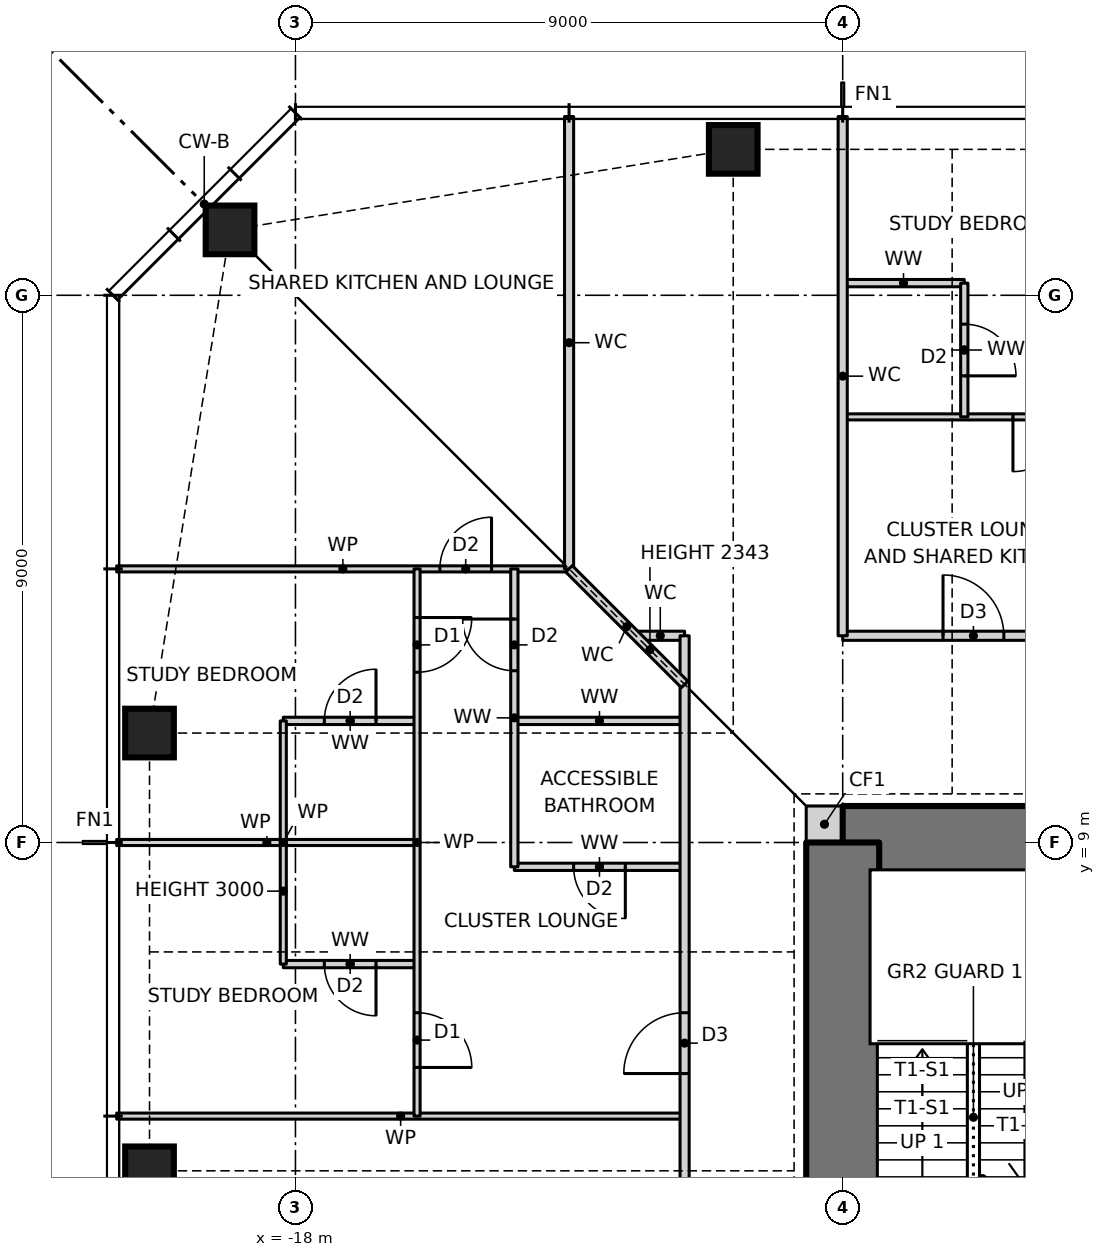
"""IFC4 building model, lengths in metres.
Left out: names, types, materials, properties, quantities, classifications, styles, units other than length and angle.
Written with IfcOpenShell. Run it as: python <this file> out.ifc"""

import sys

from ifc_helpers import new_model, si_unit, direction, frame, frame_2d, origin, origin_2d, place, context, subcontext, project, spatial, rectangle, hollow_rectangle, extrude, element, fill, save


model = new_model("IFC4")
c1 = context("Model", 3, precision=1e-05, world=origin(), true_north=direction((0.0, 1.0)))
c2 = subcontext(c1, "Body", "Model", "MODEL_VIEW")
j1 = project(units=[si_unit("LENGTHUNIT", "METRE"), si_unit("PLANEANGLEUNIT", "RADIAN")], contexts=[c1])
p1 = place(None, origin())
s1 = spatial("IfcSite", under=j1, at=p1, CompositionType="ELEMENT")
p2 = place(p1, origin())
s2 = spatial("IfcBuilding", under=s1, at=p2, CompositionType="ELEMENT")
p3 = place(p2, frame((0.0, 0.0, 119.0)))
s3 = spatial("IfcBuildingStorey", under=s2, at=p3, CompositionType="ELEMENT", Elevation=119.0)
for number, where, z_axis, x_axis in (
    (1, (-10.8, 20.4, 0.0), (0.0, 0.0, 1.0), (1.0, 0.0, 0.0)),
    (2, (-19.076, 19.076, 0.0), (0.0, 0.0, 1.0), (1.0, 0.0, 0.0)),
    (3, (-20.4, 10.8, 0.0), (0.0, 0.0, 1.0), (1.0, 0.0, 0.0)),
    (4, (-20.4, 3.6, 0.0), (0.0, 0.0, 1.0), (1.0, 0.0, 0.0)),
):
    element("IfcColumn", number, at=place(p3, frame(where, z_axis=z_axis, x_axis=x_axis)), inside=s3, PredefinedType="COLUMN", context=c2, shape_type="SweptSolid", body=[
        extrude(hollow_rectangle(XDim=0.8, YDim=0.8, WallThickness=0.07, at=origin_2d()), origin(), (0.0, 0.0, 1.0), 3.5),
    ])
p4 = place(p3, frame((-9.6, 9.3, 0.0), z_axis=(0.0, 0.0, 1.0), x_axis=(1.0, 0.0, 0.0)))
e5 = element("IfcWall", 5, at=p4, inside=s3, PredefinedType="SOLIDWALL", context=c2, shape_type="SweptSolid", body=[
    extrude(rectangle(XDim=0.6, YDim=0.6, at=frame_2d((0.3, 0.0))), origin(), (0.0, 0.0, 1.0), 3.5),
])
p5 = place(p3, frame((9.0, 9.0, 0.0), z_axis=(0.0, 0.0, 1.0), x_axis=(-1.0, 0.0, 0.0)))
e6 = element("IfcWall", 6, at=p5, inside=s3, PredefinedType="SHEAR", context=c2, shape_type="SweptSolid", body=[
    extrude(rectangle(XDim=18.0, YDim=1.2, at=frame_2d((9.0, 0.0))), origin(), (0.0, 0.0, 1.0), 3.5),
])
p6 = place(p5, frame((11.125, 0.0, 0.0)))
e7 = element("IfcOpeningElement", 7, at=p6, cuts=e6, PredefinedType="OPENING", context=c2, shape_type="SweptSolid", body=[
    extrude(rectangle(XDim=0.9, YDim=2.1, at=frame_2d((0.45, 1.05))), frame((0.0, 0.61, 0.0), z_axis=(0.0, -1.0, 0.0), x_axis=(1.0, 0.0, 0.0)), (0.0, 0.0, 1.0), 1.22),
])
p7 = place(p5, frame((4.275, 0.0, 0.0)))
e8 = element("IfcOpeningElement", 8, at=p7, cuts=e6, PredefinedType="OPENING", context=c2, shape_type="SweptSolid", body=[
    extrude(rectangle(XDim=0.9, YDim=2.1, at=frame_2d((0.45, 1.05))), frame((0.0, 0.61, 0.0), z_axis=(0.0, -1.0, 0.0), x_axis=(1.0, 0.0, 0.0)), (0.0, 0.0, 1.0), 1.22),
])
p8 = place(p3, frame((-9.0, 9.0, 0.0), z_axis=(0.0, 0.0, 1.0), x_axis=(0.0, -1.0, 0.0)))
e9 = element("IfcWall", 9, at=p8, inside=s3, PredefinedType="SHEAR", context=c2, shape_type="SweptSolid", body=[
    extrude(rectangle(XDim=18.0, YDim=1.2, at=frame_2d((9.0, 0.0))), origin(), (0.0, 0.0, 1.0), 3.5),
])
p9 = place(p8, frame((8.5, 0.0, 0.0)))
e10 = element("IfcOpeningElement", 10, at=p9, cuts=e9, PredefinedType="OPENING", context=c2, shape_type="SweptSolid", body=[
    extrude(rectangle(XDim=1.0, YDim=2.1, at=frame_2d((0.5, 1.05))), frame((0.0, 0.61, 0.0), z_axis=(0.0, -1.0, 0.0), x_axis=(1.0, 0.0, 0.0)), (0.0, 0.0, 1.0), 1.22),
])
p10 = place(p3, frame((-20.94, 4.5, 0.0), z_axis=(0.0, 0.0, 1.0), x_axis=(1.0, 0.0, 0.0)))
e11 = element("IfcWall", 11, at=p10, inside=s3, PredefinedType="PARTITIONING", context=c2, shape_type="SweptSolid", body=[
    extrude(rectangle(XDim=9.34, YDim=0.1, at=frame_2d((4.67, 0.0))), origin(), (0.0, 0.0, 1.0), 3.27),
])
p11 = place(p3, frame((-18.2, 7.0, 0.0), z_axis=(0.0, 0.0, 1.0), x_axis=(1.0, 0.0, 0.0)))
e12 = element("IfcWall", 12, at=p11, inside=s3, PredefinedType="PARTITIONING", context=c2, shape_type="SweptSolid", body=[
    extrude(rectangle(XDim=2.2, YDim=0.12, at=frame_2d((1.1, 0.0))), origin(), (0.0, 0.0, 1.0), 3.27),
])
p12 = place(p11, frame((0.675, 0.0, 0.0)))
e13 = element("IfcOpeningElement", 13, at=p12, cuts=e12, PredefinedType="OPENING", context=c2, shape_type="SweptSolid", body=[
    extrude(rectangle(XDim=0.85, YDim=2.1, at=frame_2d((0.425, 1.05))), frame((0.0, 0.07, 0.0), z_axis=(0.0, -1.0, 0.0), x_axis=(1.0, 0.0, 0.0)), (0.0, 0.0, 1.0), 0.14),
])
p13 = place(p3, frame((-14.4, 8.6, 0.0), z_axis=(0.0, 0.0, 1.0), x_axis=(1.0, 0.0, 0.0)))
e14 = element("IfcWall", 14, at=p13, inside=s3, PredefinedType="PARTITIONING", context=c2, shape_type="SweptSolid", body=[
    extrude(rectangle(XDim=2.8, YDim=0.12, at=frame_2d((1.4, 0.0))), origin(), (0.0, 0.0, 1.0), 3.27),
])
p14 = place(p13, frame((0.975, 0.0, 0.0)))
e15 = element("IfcOpeningElement", 15, at=p14, cuts=e14, PredefinedType="OPENING", context=c2, shape_type="SweptSolid", body=[
    extrude(rectangle(XDim=0.85, YDim=2.1, at=frame_2d((0.425, 1.05))), frame((0.0, 0.07, 0.0), z_axis=(0.0, -1.0, 0.0), x_axis=(1.0, 0.0, 0.0)), (0.0, 0.0, 1.0), 0.14),
])
p15 = place(p3, frame((-20.94, 9.0, 0.0), z_axis=(0.0, 0.0, 1.0), x_axis=(1.0, 0.0, 0.0)))
e16 = element("IfcWall", 16, at=p15, inside=s3, PredefinedType="PARTITIONING", context=c2, shape_type="SweptSolid", body=[
    extrude(rectangle(XDim=4.94, YDim=0.1, at=frame_2d((2.47, 0.0))), origin(), (0.0, 0.0, 1.0), 3.27),
])
p16 = place(p3, frame((-18.2, 11.0, 0.0), z_axis=(0.0, 0.0, 1.0), x_axis=(1.0, 0.0, 0.0)))
e17 = element("IfcWall", 17, at=p16, inside=s3, PredefinedType="PARTITIONING", context=c2, shape_type="SweptSolid", body=[
    extrude(rectangle(XDim=2.2, YDim=0.12, at=frame_2d((1.1, 0.0))), origin(), (0.0, 0.0, 1.0), 3.27),
])
p17 = place(p16, frame((0.675, 0.0, 0.0)))
e18 = element("IfcOpeningElement", 18, at=p17, cuts=e17, PredefinedType="OPENING", context=c2, shape_type="SweptSolid", body=[
    extrude(rectangle(XDim=0.85, YDim=2.1, at=frame_2d((0.425, 1.05))), frame((0.0, 0.07, 0.0), z_axis=(0.0, -1.0, 0.0), x_axis=(1.0, 0.0, 0.0)), (0.0, 0.0, 1.0), 0.14),
])
p18 = place(p3, frame((-14.4, 11.0, 0.0), z_axis=(0.0, 0.0, 1.0), x_axis=(1.0, 0.0, 0.0)))
e19 = element("IfcWall", 19, at=p18, inside=s3, PredefinedType="PARTITIONING", context=c2, shape_type="SweptSolid", body=[
    extrude(rectangle(XDim=2.8, YDim=0.12, at=frame_2d((1.4, 0.0))), origin(), (0.0, 0.0, 1.0), 3.27),
])
p19 = place(p3, frame((-12.4, 12.4, 0.0), z_axis=(0.0, 0.0, 1.0), x_axis=(1.0, 0.0, 0.0)))
e20 = element("IfcWall", 20, at=p19, inside=s3, PredefinedType="PARTITIONING", context=c2, shape_type="SweptSolid", body=[
    extrude(rectangle(XDim=0.8, YDim=0.15, at=frame_2d((0.4, 0.0))), origin(), (0.0, 0.0, 1.0), 3.27),
])
p20 = place(p3, frame((-9.0, 12.4, 0.0), z_axis=(0.0, 0.0, 1.0), x_axis=(1.0, 0.0, 0.0)))
e21 = element("IfcWall", 21, at=p20, inside=s3, PredefinedType="PARTITIONING", context=c2, shape_type="SweptSolid", body=[
    extrude(rectangle(XDim=21.4, YDim=0.15, at=frame_2d((10.7, 0.0))), origin(), (0.0, 0.0, 1.0), 3.27),
])
p21 = place(p20, frame((17.05, 0.0, 0.0)))
e22 = element("IfcOpeningElement", 22, at=p21, cuts=e21, PredefinedType="OPENING", context=c2, shape_type="SweptSolid", body=[
    extrude(rectangle(XDim=1.0, YDim=2.1, at=frame_2d((0.5, 1.05))), frame((0.0, 0.085, 0.0), z_axis=(0.0, -1.0, 0.0), x_axis=(1.0, 0.0, 0.0)), (0.0, 0.0, 1.0), 0.17),
])
p22 = place(p20, frame((1.65, 0.0, 0.0)))
e23 = element("IfcOpeningElement", 23, at=p22, cuts=e21, PredefinedType="OPENING", context=c2, shape_type="SweptSolid", body=[
    extrude(rectangle(XDim=1.0, YDim=2.1, at=frame_2d((0.5, 1.05))), frame((0.0, 0.085, 0.0), z_axis=(0.0, -1.0, 0.0), x_axis=(1.0, 0.0, 0.0)), (0.0, 0.0, 1.0), 0.17),
])
p23 = place(p3, frame((-20.94, 13.5, 0.0), z_axis=(0.0, 0.0, 1.0), x_axis=(1.0, 0.0, 0.0)))
e24 = element("IfcWall", 24, at=p23, inside=s3, PredefinedType="PARTITIONING", context=c2, shape_type="SweptSolid", body=[
    extrude(rectangle(XDim=7.44, YDim=0.1, at=frame_2d((3.72, 0.0))), origin(), (0.0, 0.0, 1.0), 3.27),
])
p24 = place(p23, frame((5.315, 0.0, 0.0)))
e25 = element("IfcOpeningElement", 25, at=p24, cuts=e24, PredefinedType="OPENING", context=c2, shape_type="SweptSolid", body=[
    extrude(rectangle(XDim=0.85, YDim=2.1, at=frame_2d((0.425, 1.05))), frame((0.0, 0.06, 0.0), z_axis=(0.0, -1.0, 0.0), x_axis=(1.0, 0.0, 0.0)), (0.0, 0.0, 1.0), 0.12),
])
p25 = place(p3, frame((-9.0, 16.0, 0.0), z_axis=(0.0, 0.0, 1.0), x_axis=(1.0, 0.0, 0.0)))
e26 = element("IfcWall", 26, at=p25, inside=s3, PredefinedType="PARTITIONING", context=c2, shape_type="SweptSolid", body=[
    extrude(rectangle(XDim=22.5, YDim=0.1, at=frame_2d((11.25, 0.0))), origin(), (0.0, 0.0, 1.0), 3.27),
])
p26 = place(p25, frame((20.8, 0.0, 0.0)))
e27 = element("IfcOpeningElement", 27, at=p26, cuts=e26, PredefinedType="OPENING", context=c2, shape_type="SweptSolid", body=[
    extrude(rectangle(XDim=0.9, YDim=2.1, at=frame_2d((0.45, 1.05))), frame((0.0, 0.06, 0.0), z_axis=(0.0, -1.0, 0.0), x_axis=(1.0, 0.0, 0.0)), (0.0, 0.0, 1.0), 0.12),
])
p27 = place(p25, frame((14.3, 0.0, 0.0)))
e28 = element("IfcOpeningElement", 28, at=p27, cuts=e26, PredefinedType="OPENING", context=c2, shape_type="SweptSolid", body=[
    extrude(rectangle(XDim=0.9, YDim=2.1, at=frame_2d((0.45, 1.05))), frame((0.0, 0.06, 0.0), z_axis=(0.0, -1.0, 0.0), x_axis=(1.0, 0.0, 0.0)), (0.0, 0.0, 1.0), 0.12),
])
p28 = place(p25, frame((11.8, 0.0, 0.0)))
e29 = element("IfcOpeningElement", 29, at=p28, cuts=e26, PredefinedType="OPENING", context=c2, shape_type="SweptSolid", body=[
    extrude(rectangle(XDim=0.9, YDim=2.1, at=frame_2d((0.45, 1.05))), frame((0.0, 0.06, 0.0), z_axis=(0.0, -1.0, 0.0), x_axis=(1.0, 0.0, 0.0)), (0.0, 0.0, 1.0), 0.12),
])
p29 = place(p25, frame((5.3, 0.0, 0.0)))
e30 = element("IfcOpeningElement", 30, at=p29, cuts=e26, PredefinedType="OPENING", context=c2, shape_type="SweptSolid", body=[
    extrude(rectangle(XDim=0.9, YDim=2.1, at=frame_2d((0.45, 1.05))), frame((0.0, 0.06, 0.0), z_axis=(0.0, -1.0, 0.0), x_axis=(1.0, 0.0, 0.0)), (0.0, 0.0, 1.0), 0.12),
])
p30 = place(p25, frame((2.8, 0.0, 0.0)))
e31 = element("IfcOpeningElement", 31, at=p30, cuts=e26, PredefinedType="OPENING", context=c2, shape_type="SweptSolid", body=[
    extrude(rectangle(XDim=0.9, YDim=2.1, at=frame_2d((0.45, 1.05))), frame((0.0, 0.06, 0.0), z_axis=(0.0, -1.0, 0.0), x_axis=(1.0, 0.0, 0.0)), (0.0, 0.0, 1.0), 0.12),
])
p31 = place(p3, frame((-9.0, 18.2, 0.0), z_axis=(0.0, 0.0, 1.0), x_axis=(1.0, 0.0, 0.0)))
e32 = element("IfcWall", 32, at=p31, inside=s3, PredefinedType="PARTITIONING", context=c2, shape_type="SweptSolid", body=[
    extrude(rectangle(XDim=2.0, YDim=0.12, at=frame_2d((1.0, 0.0))), origin(), (0.0, 0.0, 1.0), 3.27),
])
p32 = place(p3, frame((-7.0, 16.0, 0.0), z_axis=(0.0, 0.0, 1.0), x_axis=(0.0, 1.0, 0.0)))
e33 = element("IfcWall", 33, at=p32, inside=s3, PredefinedType="PARTITIONING", context=c2, shape_type="SweptSolid", body=[
    extrude(rectangle(XDim=2.2, YDim=0.12, at=frame_2d((1.1, 0.0))), origin(), (0.0, 0.0, 1.0), 3.27),
])
p33 = place(p32, frame((0.675, 0.0, 0.0)))
e34 = element("IfcOpeningElement", 34, at=p33, cuts=e33, PredefinedType="OPENING", context=c2, shape_type="SweptSolid", body=[
    extrude(rectangle(XDim=0.85, YDim=2.1, at=frame_2d((0.425, 1.05))), frame((0.0, 0.07, 0.0), z_axis=(0.0, -1.0, 0.0), x_axis=(1.0, 0.0, 0.0)), (0.0, 0.0, 1.0), 0.14),
])
p34 = place(p3, frame((-9.0, 12.4, 0.0), z_axis=(0.0, 0.0, 1.0), x_axis=(0.0, 1.0, 0.0)))
e35 = element("IfcWall", 35, at=p34, inside=s3, PredefinedType="PARTITIONING", context=c2, shape_type="SweptSolid", body=[
    extrude(rectangle(XDim=8.54, YDim=0.15, at=frame_2d((4.27, 0.0))), origin(), (0.0, 0.0, 1.0), 3.27),
])
p35 = place(p3, frame((-11.6, -9.0, 0.0), z_axis=(0.0, 0.0, 1.0), x_axis=(0.0, 1.0, 0.0)))
e36 = element("IfcWall", 36, at=p35, inside=s3, PredefinedType="PARTITIONING", context=c2, shape_type="SweptSolid", body=[
    extrude(rectangle(XDim=21.4, YDim=0.15, at=frame_2d((10.7, 0.0))), origin(), (0.0, 0.0, 1.0), 3.27),
])
p36 = place(p35, frame((14.2, 0.0, 0.0)))
e37 = element("IfcOpeningElement", 37, at=p36, cuts=e36, PredefinedType="OPENING", context=c2, shape_type="SweptSolid", body=[
    extrude(rectangle(XDim=1.0, YDim=2.1, at=frame_2d((0.5, 1.05))), frame((0.0, 0.085, 0.0), z_axis=(0.0, -1.0, 0.0), x_axis=(1.0, 0.0, 0.0)), (0.0, 0.0, 1.0), 0.17),
])
p37 = place(p35, frame((5.85, 0.0, 0.0)))
e38 = element("IfcOpeningElement", 38, at=p37, cuts=e36, PredefinedType="OPENING", context=c2, shape_type="SweptSolid", body=[
    extrude(rectangle(XDim=1.8, YDim=2.1, at=frame_2d((0.9, 1.05))), frame((0.0, 0.085, 0.0), z_axis=(0.0, -1.0, 0.0), x_axis=(1.0, 0.0, 0.0)), (0.0, 0.0, 1.0), 0.17),
])
p38 = place(p3, frame((-13.5, 13.5, 0.0), z_axis=(0.0, 0.0, 1.0), x_axis=(0.0, 1.0, 0.0)))
e39 = element("IfcWall", 39, at=p38, inside=s3, PredefinedType="PARTITIONING", context=c2, shape_type="SweptSolid", body=[
    extrude(rectangle(XDim=7.44, YDim=0.15, at=frame_2d((3.72, 0.0))), origin(), (0.0, 0.0, 1.0), 3.27),
])
p39 = place(p3, frame((-14.4, 8.6, 0.0), z_axis=(0.0, 0.0, 1.0), x_axis=(0.0, 1.0, 0.0)))
e40 = element("IfcWall", 40, at=p39, inside=s3, PredefinedType="PARTITIONING", context=c2, shape_type="SweptSolid", body=[
    extrude(rectangle(XDim=4.9, YDim=0.12, at=frame_2d((2.45, 0.0))), origin(), (0.0, 0.0, 1.0), 3.27),
])
p40 = place(p39, frame((3.225, 0.0, 0.0)))
e41 = element("IfcOpeningElement", 41, at=p40, cuts=e40, PredefinedType="OPENING", context=c2, shape_type="SweptSolid", body=[
    extrude(rectangle(XDim=0.85, YDim=2.1, at=frame_2d((0.425, 1.05))), frame((0.0, 0.07, 0.0), z_axis=(0.0, -1.0, 0.0), x_axis=(1.0, 0.0, 0.0)), (0.0, 0.0, 1.0), 0.14),
])
p41 = place(p3, frame((-16.0, 4.5, 0.0), z_axis=(0.0, 0.0, 1.0), x_axis=(0.0, 1.0, 0.0)))
e42 = element("IfcWall", 42, at=p41, inside=s3, PredefinedType="PARTITIONING", context=c2, shape_type="SweptSolid", body=[
    extrude(rectangle(XDim=9.0, YDim=0.1, at=frame_2d((4.5, 0.0))), origin(), (0.0, 0.0, 1.0), 3.27),
])
p42 = place(p41, frame((7.3, 0.0, 0.0)))
e43 = element("IfcOpeningElement", 43, at=p42, cuts=e42, PredefinedType="OPENING", context=c2, shape_type="SweptSolid", body=[
    extrude(rectangle(XDim=0.9, YDim=2.1, at=frame_2d((0.45, 1.05))), frame((0.0, 0.06, 0.0), z_axis=(0.0, -1.0, 0.0), x_axis=(1.0, 0.0, 0.0)), (0.0, 0.0, 1.0), 0.12),
])
p43 = place(p41, frame((0.8, 0.0, 0.0)))
e44 = element("IfcOpeningElement", 44, at=p43, cuts=e42, PredefinedType="OPENING", context=c2, shape_type="SweptSolid", body=[
    extrude(rectangle(XDim=0.9, YDim=2.1, at=frame_2d((0.45, 1.05))), frame((0.0, 0.06, 0.0), z_axis=(0.0, -1.0, 0.0), x_axis=(1.0, 0.0, 0.0)), (0.0, 0.0, 1.0), 0.12),
])
p44 = place(p3, frame((-18.2, 7.0, 0.0), z_axis=(0.0, 0.0, 1.0), x_axis=(0.0, 1.0, 0.0)))
e45 = element("IfcWall", 45, at=p44, inside=s3, PredefinedType="PARTITIONING", context=c2, shape_type="SweptSolid", body=[
    extrude(rectangle(XDim=4.0, YDim=0.1, at=frame_2d((2.0, 0.0))), origin(), (0.0, 0.0, 1.0), 3.0),
])
p45 = place(p3, frame((-11.6, 11.6, 0.0), z_axis=(0.0, 0.0, 1.0), x_axis=(-0.707106781187, 0.707106781187, 0.0)))
e46 = element("IfcWall", 46, at=p45, inside=s3, PredefinedType="PARTITIONING", context=c2, shape_type="SweptSolid", body=[
    extrude(rectangle(XDim=2.687, YDim=0.15, at=frame_2d((1.343, 0.0))), origin(), (0.0, 0.0, 1.0), 2.343),
])
p46 = place(p33, frame((0.85, 0.0, 0.0), z_axis=(0.0, 0.0, 1.0), x_axis=(-1.0, 0.0, 0.0)))
e47 = element("IfcDoor", 47, at=p46, inside=s3, OperationType="SINGLE_SWING_RIGHT", PredefinedType="DOOR", context=c2, shape_type="SweptSolid", body=[
    extrude(rectangle(XDim=0.85, YDim=2.1, at=frame_2d((0.425, 1.05))), frame((0.0, 0.025, 0.0), z_axis=(0.0, -1.0, 0.0), x_axis=(1.0, 0.0, 0.0)), (0.0, 0.0, 1.0), 0.05),
])
fill(e34, e47)
p47 = place(p30, frame((0.9, 0.0, 0.0), z_axis=(0.0, 0.0, 1.0), x_axis=(-1.0, 0.0, 0.0)))
e48 = element("IfcDoor", 48, at=p47, inside=s3, OperationType="SINGLE_SWING_RIGHT", PredefinedType="DOOR", context=c2, shape_type="SweptSolid", body=[
    extrude(rectangle(XDim=0.9, YDim=2.1, at=frame_2d((0.45, 1.05))), frame((0.0, 0.025, 0.0), z_axis=(0.0, -1.0, 0.0), x_axis=(1.0, 0.0, 0.0)), (0.0, 0.0, 1.0), 0.05),
])
fill(e31, e48)
p48 = place(p22, origin())
e49 = element("IfcDoor", 49, at=p48, inside=s3, OperationType="SINGLE_SWING_LEFT", PredefinedType="DOOR", context=c2, shape_type="SweptSolid", body=[
    extrude(rectangle(XDim=1.0, YDim=2.1, at=frame_2d((0.5, 1.05))), frame((0.0, 0.025, 0.0), z_axis=(0.0, -1.0, 0.0), x_axis=(1.0, 0.0, 0.0)), (0.0, 0.0, 1.0), 0.05),
])
fill(e23, e49)
p49 = place(p17, origin())
e50 = element("IfcDoor", 50, at=p49, inside=s3, OperationType="SINGLE_SWING_RIGHT", PredefinedType="DOOR", context=c2, shape_type="SweptSolid", body=[
    extrude(rectangle(XDim=0.85, YDim=2.1, at=frame_2d((0.425, 1.05))), frame((0.0, 0.025, 0.0), z_axis=(0.0, -1.0, 0.0), x_axis=(1.0, 0.0, 0.0)), (0.0, 0.0, 1.0), 0.05),
])
fill(e18, e50)
p50 = place(p42, frame((0.9, 0.0, 0.0), z_axis=(0.0, 0.0, 1.0), x_axis=(-1.0, 0.0, 0.0)))
e51 = element("IfcDoor", 51, at=p50, inside=s3, OperationType="SINGLE_SWING_LEFT", PredefinedType="DOOR", context=c2, shape_type="SweptSolid", body=[
    extrude(rectangle(XDim=0.9, YDim=2.1, at=frame_2d((0.45, 1.05))), frame((0.0, 0.025, 0.0), z_axis=(0.0, -1.0, 0.0), x_axis=(1.0, 0.0, 0.0)), (0.0, 0.0, 1.0), 0.05),
])
fill(e43, e51)
p51 = place(p12, frame((0.85, 0.0, 0.0), z_axis=(0.0, 0.0, 1.0), x_axis=(-1.0, 0.0, 0.0)))
e52 = element("IfcDoor", 52, at=p51, inside=s3, OperationType="SINGLE_SWING_LEFT", PredefinedType="DOOR", context=c2, shape_type="SweptSolid", body=[
    extrude(rectangle(XDim=0.85, YDim=2.1, at=frame_2d((0.425, 1.05))), frame((0.0, 0.025, 0.0), z_axis=(0.0, -1.0, 0.0), x_axis=(1.0, 0.0, 0.0)), (0.0, 0.0, 1.0), 0.05),
])
fill(e13, e52)
p52 = place(p43, frame((0.9, 0.0, 0.0), z_axis=(0.0, 0.0, 1.0), x_axis=(-1.0, 0.0, 0.0)))
e53 = element("IfcDoor", 53, at=p52, inside=s3, OperationType="SINGLE_SWING_RIGHT", PredefinedType="DOOR", context=c2, shape_type="SweptSolid", body=[
    extrude(rectangle(XDim=0.9, YDim=2.1, at=frame_2d((0.45, 1.05))), frame((0.0, 0.025, 0.0), z_axis=(0.0, -1.0, 0.0), x_axis=(1.0, 0.0, 0.0)), (0.0, 0.0, 1.0), 0.05),
])
fill(e44, e53)
p53 = place(p36, origin())
e54 = element("IfcDoor", 54, at=p53, inside=s3, OperationType="SINGLE_SWING_LEFT", PredefinedType="DOOR", context=c2, shape_type="SweptSolid", body=[
    extrude(rectangle(XDim=1.0, YDim=2.1, at=frame_2d((0.5, 1.05))), frame((0.0, 0.025, 0.0), z_axis=(0.0, -1.0, 0.0), x_axis=(1.0, 0.0, 0.0)), (0.0, 0.0, 1.0), 0.05),
])
fill(e37, e54)
p54 = place(p40, origin())
e55 = element("IfcDoor", 55, at=p54, inside=s3, OperationType="SINGLE_SWING_RIGHT", PredefinedType="DOOR", context=c2, shape_type="SweptSolid", body=[
    extrude(rectangle(XDim=0.85, YDim=2.1, at=frame_2d((0.425, 1.05))), frame((0.0, 0.025, 0.0), z_axis=(0.0, -1.0, 0.0), x_axis=(1.0, 0.0, 0.0)), (0.0, 0.0, 1.0), 0.05),
])
fill(e41, e55)
p55 = place(p14, frame((0.85, 0.0, 0.0), z_axis=(0.0, 0.0, 1.0), x_axis=(-1.0, 0.0, 0.0)))
e56 = element("IfcDoor", 56, at=p55, inside=s3, OperationType="SINGLE_SWING_LEFT", PredefinedType="DOOR", context=c2, shape_type="SweptSolid", body=[
    extrude(rectangle(XDim=0.85, YDim=2.1, at=frame_2d((0.425, 1.05))), frame((0.0, 0.025, 0.0), z_axis=(0.0, -1.0, 0.0), x_axis=(1.0, 0.0, 0.0)), (0.0, 0.0, 1.0), 0.05),
])
fill(e15, e56)
p56 = place(p24, origin())
e57 = element("IfcDoor", 57, at=p56, inside=s3, OperationType="SINGLE_SWING_RIGHT", PredefinedType="DOOR", context=c2, shape_type="SweptSolid", body=[
    extrude(rectangle(XDim=0.85, YDim=2.1, at=frame_2d((0.425, 1.05))), frame((0.0, 0.025, 0.0), z_axis=(0.0, -1.0, 0.0), x_axis=(1.0, 0.0, 0.0)), (0.0, 0.0, 1.0), 0.05),
])
fill(e25, e57)
save(model, sys.argv[1])
